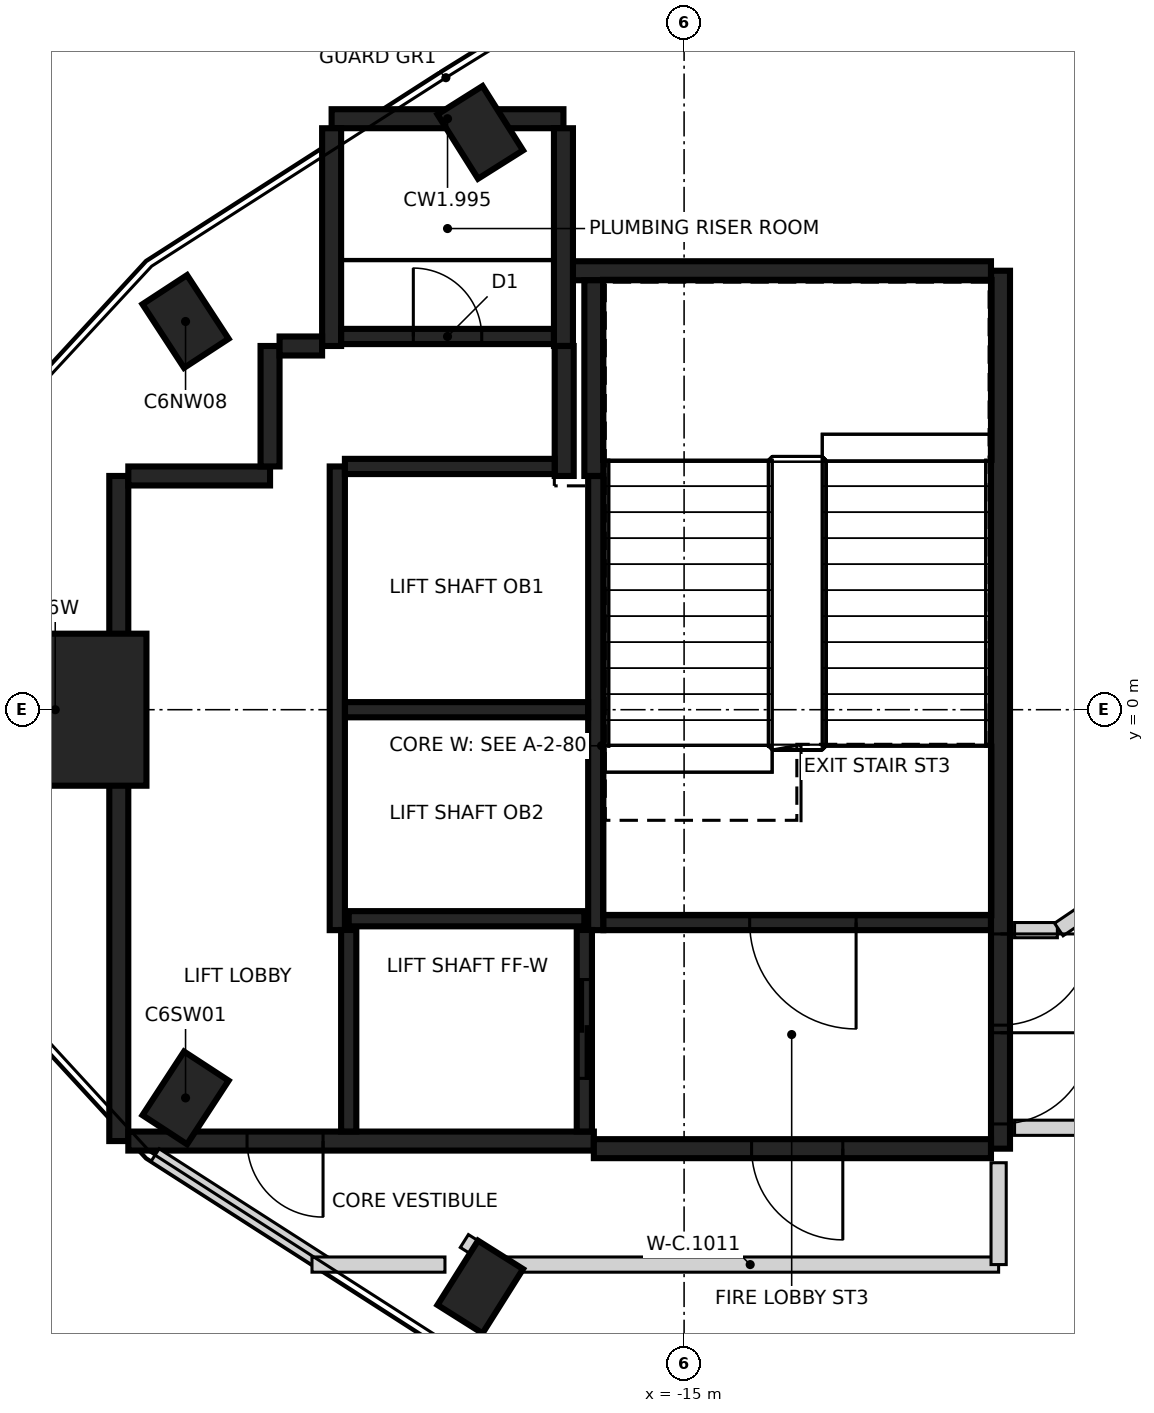
"""IFC4 building model, lengths in metres.
Left out: names, types, materials, properties, quantities, classifications, styles, units other than length and angle.
Written with IfcOpenShell. Run it as: python <this file> out.ifc"""

import sys

from ifc_helpers import new_model, si_unit, direction, frame, frame_2d, origin, origin_2d, place, context, subcontext, project, spatial, rectangle, extrude, element, fill, save


model = new_model("IFC4")
c1 = context("Model", 3, precision=1e-05, world=origin(), true_north=direction((0.0, 1.0)))
c2 = subcontext(c1, "Body", "Model", "MODEL_VIEW")
j1 = project(units=[si_unit("LENGTHUNIT", "METRE"), si_unit("PLANEANGLEUNIT", "RADIAN")], contexts=[c1])
p1 = place(None, origin())
s1 = spatial("IfcSite", under=j1, at=p1, CompositionType="ELEMENT")
p2 = place(p1, origin())
s2 = spatial("IfcBuilding", under=s1, at=p2, CompositionType="ELEMENT")
p3 = place(p2, frame((0.0, 0.0, 283.8)))
s3 = spatial("IfcBuildingStorey", under=s2, at=p3, CompositionType="ELEMENT", Elevation=283.8)
for number, where, z_axis, x_axis in (
    (1, (-17.681, 7.595, -0.35), (0.0, 0.0, 1.0), (-0.533, 0.846, 0.0)),
    (2, (-21.559, 5.107, -0.35), (0.0, 0.0, 1.0), (-0.547, 0.837, 0.0)),
    (3, (-21.559, -5.107, -0.35), (0.0, 0.0, 1.0), (0.547, 0.837, 0.0)),
    (4, (-17.681, -7.595, -0.35), (0.0, 0.0, 1.0), (0.533, 0.846, 0.0)),
):
    element("IfcColumn", number, at=place(p3, frame(where, z_axis=z_axis, x_axis=x_axis)), inside=s3, PredefinedType="COLUMN", context=c2, shape_type="SweptSolid", body=[
        extrude(rectangle(XDim=1.0, YDim=0.7, at=origin_2d()), origin(), (0.0, 0.0, 1.0), 7.2),
    ])
p4 = place(p3, frame((-23.273, 0.0, -0.35), z_axis=(0.0, 0.0, 1.0), x_axis=(1.0, 0.0, 0.0)))
e5 = element("IfcColumn", 5, at=p4, inside=s3, PredefinedType="COLUMN", context=c2, shape_type="SweptSolid", body=[
    extrude(rectangle(XDim=2.4, YDim=2.0, at=origin_2d()), origin(), (0.0, 0.0, 1.0), 7.2),
])
p5 = place(p3, frame((-10.837, 5.775, 0.0), z_axis=(0.0, 0.0, 1.0), x_axis=(0.0, -1.0, 0.0)))
e6 = element("IfcWall", 6, at=p5, inside=s3, PredefinedType="SHEAR", context=c2, shape_type="SweptSolid", body=[
    extrude(rectangle(XDim=11.55, YDim=0.25, at=frame_2d((5.775, 0.0))), origin(), (0.0, 0.0, 1.0), 6.85),
])
p6 = place(p5, frame((10.025, 0.0, 0.0)))
e7 = element("IfcOpeningElement", 7, at=p6, cuts=e6, PredefinedType="OPENING", context=c2, shape_type="SweptSolid", body=[
    extrude(rectangle(XDim=1.2, YDim=2.1, at=frame_2d((0.6, 1.05))), frame((0.0, 0.135, 0.0), z_axis=(0.0, -1.0, 0.0), x_axis=(1.0, 0.0, 0.0)), (0.0, 0.0, 1.0), 0.27),
])
p7 = place(p5, frame((8.725, 0.0, 0.0)))
e8 = element("IfcOpeningElement", 8, at=p7, cuts=e6, PredefinedType="OPENING", context=c2, shape_type="SweptSolid", body=[
    extrude(rectangle(XDim=1.2, YDim=2.1, at=frame_2d((0.6, 1.05))), frame((0.0, 0.135, 0.0), z_axis=(0.0, -1.0, 0.0), x_axis=(1.0, 0.0, 0.0)), (0.0, 0.0, 1.0), 0.27),
])
p8 = place(p3, frame((-22.437, -5.675, 0.0), z_axis=(0.0, 0.0, 1.0), x_axis=(0.0, 1.0, 0.0)))
e9 = element("IfcWall", 9, at=p8, inside=s3, PredefinedType="SHEAR", context=c2, shape_type="SweptSolid", body=[
    extrude(rectangle(XDim=8.75, YDim=0.25, at=frame_2d((4.375, 0.0))), origin(), (0.0, 0.0, 1.0), 6.85),
])
p9 = place(p3, frame((-16.187, -5.675, 0.0), z_axis=(0.0, 0.0, 1.0), x_axis=(-1.0, 0.0, 0.0)))
e10 = element("IfcWall", 10, at=p9, inside=s3, PredefinedType="SHEAR", context=c2, shape_type="SweptSolid", body=[
    extrude(rectangle(XDim=6.125, YDim=0.25, at=frame_2d((3.062, 0.0))), origin(), (0.0, 0.0, 1.0), 6.85),
])
p10 = place(p9, frame((3.563, 0.0, 0.0)))
e11 = element("IfcOpeningElement", 11, at=p10, cuts=e10, PredefinedType="OPENING", context=c2, shape_type="SweptSolid", body=[
    extrude(rectangle(XDim=1.0, YDim=2.1, at=frame_2d((0.5, 1.05))), frame((0.0, 0.135, 0.0), z_axis=(0.0, -1.0, 0.0), x_axis=(1.0, 0.0, 0.0)), (0.0, 0.0, 1.0), 0.27),
])
p11 = place(p3, frame((-10.963, -5.775, 0.0), z_axis=(0.0, 0.0, 1.0), x_axis=(-1.0, 0.0, 0.0)))
e12 = element("IfcWall", 12, at=p11, inside=s3, PredefinedType="SHEAR", context=c2, shape_type="SweptSolid", body=[
    extrude(rectangle(XDim=5.225, YDim=0.25, at=frame_2d((2.612, 0.0))), origin(), (0.0, 0.0, 1.0), 6.85),
])
p12 = place(p11, frame((1.949, 0.0, 0.0)))
e13 = element("IfcOpeningElement", 13, at=p12, cuts=e12, PredefinedType="OPENING", context=c2, shape_type="SweptSolid", body=[
    extrude(rectangle(XDim=1.2, YDim=2.1, at=frame_2d((0.6, 1.05))), frame((0.0, 0.135, 0.0), z_axis=(0.0, -1.0, 0.0), x_axis=(1.0, 0.0, 0.0)), (0.0, 0.0, 1.0), 0.27),
])
p13 = place(p3, frame((-16.472, 5.775, 0.0), z_axis=(0.0, 0.0, 1.0), x_axis=(1.0, 0.0, 0.0)))
e14 = element("IfcWall", 14, at=p13, inside=s3, PredefinedType="SHEAR", context=c2, shape_type="SweptSolid", body=[
    extrude(rectangle(XDim=5.51, YDim=0.25, at=frame_2d((2.755, 0.0))), origin(), (0.0, 0.0, 1.0), 6.85),
])
p14 = place(p3, frame((-19.637, 7.775, 0.0), z_axis=(0.0, 0.0, 1.0), x_axis=(1.0, 0.0, 0.0)))
e15 = element("IfcWall", 15, at=p14, inside=s3, PredefinedType="SHEAR", context=c2, shape_type="SweptSolid", body=[
    extrude(rectangle(XDim=3.05, YDim=0.25, at=frame_2d((1.525, 0.0))), origin(), (0.0, 0.0, 1.0), 6.85),
])
for number, where, z_axis, x_axis in (
    (16, (-16.587, 7.65, 0.0), (0.0, 0.0, 1.0), (0.0, -1.0, 0.0)),
    (17, (-19.637, 4.785, 0.0), (0.0, 0.0, 1.0), (0.0, 1.0, 0.0)),
):
    element("IfcWall", number, at=place(p3, frame(where, z_axis=z_axis, x_axis=x_axis)), inside=s3, PredefinedType="SHEAR", context=c2, shape_type="SweptSolid", body=[
        extrude(rectangle(XDim=2.865, YDim=0.25, at=frame_2d((1.432, 0.0))), origin(), (0.0, 0.0, 1.0), 6.85),
    ])
p15 = place(p3, frame((-16.187, 3.075, 0.0), z_axis=(0.0, 0.0, 1.0), x_axis=(0.0, 1.0, 0.0)))
e18 = element("IfcWall", 18, at=p15, inside=s3, PredefinedType="SHEAR", context=c2, shape_type="SweptSolid", body=[
    extrude(rectangle(XDim=2.575, YDim=0.25, at=frame_2d((1.287, 0.0))), origin(), (0.0, 0.0, 1.0), 6.85),
])
p16 = place(p3, frame((-22.312, 3.075, 0.0), z_axis=(0.0, 0.0, 1.0), x_axis=(1.0, 0.0, 0.0)))
e19 = element("IfcWall", 19, at=p16, inside=s3, PredefinedType="SHEAR", context=c2, shape_type="SweptSolid", body=[
    extrude(rectangle(XDim=1.865, YDim=0.25, at=frame_2d((0.932, 0.0))), origin(), (0.0, 0.0, 1.0), 6.85),
])
p17 = place(p3, frame((-16.577, 4.785, 0.0), z_axis=(0.0, 0.0, 1.0), x_axis=(0.0, -1.0, 0.0)))
e20 = element("IfcWall", 20, at=p17, inside=s3, PredefinedType="SHEAR", context=c2, shape_type="SweptSolid", body=[
    extrude(rectangle(XDim=1.71, YDim=0.25, at=frame_2d((0.855, 0.0))), origin(), (0.0, 0.0, 1.0), 6.85),
])
p18 = place(p3, frame((-20.447, 3.2, 0.0), z_axis=(0.0, 0.0, 1.0), x_axis=(0.0, 1.0, 0.0)))
e21 = element("IfcWall", 21, at=p18, inside=s3, PredefinedType="SHEAR", context=c2, shape_type="SweptSolid", body=[
    extrude(rectangle(XDim=1.584, YDim=0.25, at=frame_2d((0.792, 0.0))), origin(), (0.0, 0.0, 1.0), 6.85),
])
p19 = place(p3, frame((-20.322, 4.785, 0.0), z_axis=(0.0, 0.0, 1.0), x_axis=(1.0, 0.0, 0.0)))
e22 = element("IfcWall", 22, at=p19, inside=s3, PredefinedType="SHEAR", context=c2, shape_type="SweptSolid", body=[
    extrude(rectangle(XDim=0.559, YDim=0.25, at=frame_2d((0.28, 0.0))), origin(), (0.0, 0.0, 1.0), 6.85),
])
p20 = place(p3, frame((-16.162, 3.074, 0.0), z_axis=(0.0, 0.0, 1.0), x_axis=(0.0, -1.0, 0.0)))
e23 = element("IfcWall", 23, at=p20, inside=s3, PredefinedType="SHEAR", context=c2, shape_type="SweptSolid", body=[
    extrude(rectangle(XDim=5.974, YDim=0.2, at=frame_2d((2.987, 0.0))), origin(), (0.0, 0.0, 1.0), 6.85),
])
p21 = place(p3, frame((-19.562, -2.9, 0.0), z_axis=(0.0, 0.0, 1.0), x_axis=(0.0, 1.0, 0.0)))
e24 = element("IfcWall", 24, at=p21, inside=s3, PredefinedType="SHEAR", context=c2, shape_type="SweptSolid", body=[
    extrude(rectangle(XDim=6.1, YDim=0.2, at=frame_2d((3.05, 0.0))), origin(), (0.0, 0.0, 1.0), 6.85),
])
p22 = place(p3, frame((-10.963, -2.8, 0.0), z_axis=(0.0, 0.0, 1.0), x_axis=(-1.0, 0.0, 0.0)))
e25 = element("IfcWall", 25, at=p22, inside=s3, PredefinedType="SHEAR", context=c2, shape_type="SweptSolid", body=[
    extrude(rectangle(XDim=5.098, YDim=0.2, at=frame_2d((2.549, 0.0))), origin(), (0.0, 0.0, 1.0), 6.85),
])
p23 = place(p22, frame((1.774, 0.0, 0.0)))
e26 = element("IfcOpeningElement", 26, at=p23, cuts=e25, PredefinedType="OPENING", context=c2, shape_type="SweptSolid", body=[
    extrude(rectangle(XDim=1.4, YDim=2.1, at=frame_2d((0.7, 1.05))), frame((0.0, 0.11, 0.0), z_axis=(0.0, -1.0, 0.0), x_axis=(1.0, 0.0, 0.0)), (0.0, 0.0, 1.0), 0.22),
])
p24 = place(p3, frame((-16.263, 0.0, 0.0), z_axis=(0.0, 0.0, 1.0), x_axis=(-1.0, 0.0, 0.0)))
e27 = element("IfcWall", 27, at=p24, inside=s3, PredefinedType="SHEAR", context=c2, shape_type="SweptSolid", body=[
    extrude(rectangle(XDim=3.198, YDim=0.2, at=frame_2d((1.599, 0.0))), origin(), (0.0, 0.0, 1.0), 6.85),
])
p25 = place(p3, frame((-19.511, 4.91, 0.0), z_axis=(0.0, 0.0, 1.0), x_axis=(1.0, 0.0, 0.0)))
e28 = element("IfcWall", 28, at=p25, inside=s3, PredefinedType="SHEAR", context=c2, shape_type="SweptSolid", body=[
    extrude(rectangle(XDim=2.798, YDim=0.2, at=frame_2d((1.399, 0.0))), origin(), (0.0, 0.0, 1.0), 6.85),
])
p26 = place(p25, frame((0.949, 0.0, 0.0)))
e29 = element("IfcOpeningElement", 29, at=p26, cuts=e28, PredefinedType="OPENING", context=c2, shape_type="SweptSolid", body=[
    extrude(rectangle(XDim=0.9, YDim=2.1, at=frame_2d((0.45, 1.05))), frame((0.0, 0.11, 0.0), z_axis=(0.0, -1.0, 0.0), x_axis=(1.0, 0.0, 0.0)), (0.0, 0.0, 1.0), 0.22),
])
p27 = place(p3, frame((-19.462, 3.2, 0.0), z_axis=(0.0, 0.0, 1.0), x_axis=(1.0, 0.0, 0.0)))
e30 = element("IfcWall", 30, at=p27, inside=s3, PredefinedType="SHEAR", context=c2, shape_type="SweptSolid", body=[
    extrude(rectangle(XDim=2.759, YDim=0.2, at=frame_2d((1.379, 0.0))), origin(), (0.0, 0.0, 1.0), 6.85),
])
p28 = place(p3, frame((-19.412, -2.75, 0.0), z_axis=(0.0, 0.0, 1.0), x_axis=(1.0, 0.0, 0.0)))
e31 = element("IfcWall", 31, at=p28, inside=s3, PredefinedType="SHEAR", context=c2, shape_type="SweptSolid", body=[
    extrude(rectangle(XDim=3.1, YDim=0.2, at=frame_2d((1.55, 0.0))), origin(), (0.0, 0.0, 1.0), 6.85),
])
p29 = place(p3, frame((-16.312, -2.898, 0.0), z_axis=(0.0, 0.0, 1.0), x_axis=(0.0, -1.0, 0.0)))
e32 = element("IfcWall", 32, at=p29, inside=s3, PredefinedType="SHEAR", context=c2, shape_type="SweptSolid", body=[
    extrude(rectangle(XDim=2.651, YDim=0.2, at=frame_2d((1.325, 0.0))), origin(), (0.0, 0.0, 1.0), 6.85),
])
p30 = place(p29, frame((0.652, 0.0, 0.0)))
e33 = element("IfcOpeningElement", 33, at=p30, cuts=e32, PredefinedType="OPENING", context=c2, shape_type="SweptSolid", body=[
    extrude(rectangle(XDim=1.3, YDim=2.1, at=frame_2d((0.65, 1.05))), frame((0.0, 0.11, 0.0), z_axis=(0.0, -1.0, 0.0), x_axis=(1.0, 0.0, 0.0)), (0.0, 0.0, 1.0), 0.22),
])
p31 = place(p3, frame((-19.412, -5.549, 0.0), z_axis=(0.0, 0.0, 1.0), x_axis=(0.0, 1.0, 0.0)))
e34 = element("IfcWall", 34, at=p31, inside=s3, PredefinedType="SHEAR", context=c2, shape_type="SweptSolid", body=[
    extrude(rectangle(XDim=2.651, YDim=0.2, at=frame_2d((1.325, 0.0))), origin(), (0.0, 0.0, 1.0), 6.85),
])
p32 = place(p3, frame((-21.96, -5.86, 0.0), z_axis=(0.0, 0.0, 1.0), x_axis=(0.841722340019, -0.539910642896, 0.0)))
e35 = element("IfcWall", 35, at=p32, inside=s3, PredefinedType="PARTITIONING", context=c2, shape_type="SweptSolid", body=[
    extrude(rectangle(XDim=2.667, YDim=0.2, at=frame_2d((1.333, 0.0))), origin(), (0.0, 0.0, 1.0), 6.85),
])
p33 = place(p3, frame((-19.896, -7.3, 0.0), z_axis=(0.0, 0.0, 1.0), x_axis=(1.0, 0.0, 0.0)))
e36 = element("IfcWall", 36, at=p33, inside=s3, PredefinedType="PARTITIONING", context=c2, shape_type="SweptSolid", body=[
    extrude(rectangle(XDim=1.75, YDim=0.2, at=frame_2d((0.875, 0.0))), origin(), (0.0, 0.0, 1.0), 5.95),
])
p34 = place(p3, frame((-17.891, -6.99, 0.0), z_axis=(0.0, 0.0, 1.0), x_axis=(0.846106660275, -0.533013620312, 0.0)))
e37 = element("IfcWall", 37, at=p34, inside=s3, PredefinedType="PARTITIONING", context=c2, shape_type="SweptSolid", body=[
    extrude(rectangle(XDim=0.582, YDim=0.2, at=frame_2d((0.291, 0.0))), origin(), (0.0, 0.0, 1.0), 6.85),
])
p35 = place(p3, frame((-17.399, -7.3, 0.0), z_axis=(0.0, 0.0, 1.0), x_axis=(1.0, 0.0, 0.0)))
e38 = element("IfcWall", 38, at=p35, inside=s3, PredefinedType="PARTITIONING", context=c2, shape_type="SweptSolid", body=[
    extrude(rectangle(XDim=6.537, YDim=0.2, at=frame_2d((3.269, 0.0))), origin(), (0.0, 0.0, 1.0), 6.85),
])
p36 = place(p3, frame((-10.862, -7.3, 0.0), z_axis=(0.0, 0.0, 1.0), x_axis=(0.0, 1.0, 0.0)))
e39 = element("IfcWall", 39, at=p36, inside=s3, PredefinedType="PARTITIONING", context=c2, shape_type="SweptSolid", body=[
    extrude(rectangle(XDim=1.34, YDim=0.2, at=frame_2d((0.67, 0.0))), origin(), (0.0, 0.0, 1.0), 6.85),
])
p37 = place(p3, frame((-10.652, -5.5, 0.0), z_axis=(0.0, 0.0, 1.0), x_axis=(1.0, 0.0, 0.0)))
e40 = element("IfcWall", 40, at=p37, inside=s3, PredefinedType="PARTITIONING", context=c2, shape_type="SweptSolid", body=[
    extrude(rectangle(XDim=1.989, YDim=0.2, at=frame_2d((0.995, 0.0))), origin(), (0.0, 0.0, 1.0), 6.85),
])
p38 = place(p3, frame((-10.652, -2.9, 0.0), z_axis=(0.0, 0.0, 1.0), x_axis=(1.0, 0.0, 0.0)))
e41 = element("IfcWall", 41, at=p38, inside=s3, PredefinedType="PARTITIONING", context=c2, shape_type="SweptSolid", body=[
    extrude(rectangle(XDim=0.563, YDim=0.2, at=frame_2d((0.282, 0.0))), origin(), (0.0, 0.0, 1.0), 6.85),
])
p39 = place(p3, frame((-10.07, -2.892, 0.0), z_axis=(0.0, 0.0, 1.0), x_axis=(0.828131902324, 0.560533274974, 0.0)))
e42 = element("IfcWall", 42, at=p39, inside=s3, PredefinedType="PARTITIONING", context=c2, shape_type="SweptSolid", body=[
    extrude(rectangle(XDim=2.332, YDim=0.2, at=frame_2d((1.166, 0.0))), origin(), (0.0, 0.0, 1.0), 6.85),
])
p40 = place(p3, frame((-12.917, -11.631, 0.0), z_axis=(0.0, 0.0, 1.0), x_axis=(0.743160324176, 0.669113392909, 0.0)))
e43 = element("IfcWall", 43, at=p40, inside=s3, PredefinedType="PARTITIONING", context=c2, shape_type="SweptSolid", body=[
    extrude(rectangle(XDim=11.068, YDim=0.2, at=frame_2d((5.534, 0.0))), origin(), (0.0, 0.0, 1.0), 5.95),
])
p41 = place(p30, origin())
e44 = element("IfcDoor", 44, at=p41, inside=s3, OperationType="SLIDING_TO_RIGHT", PredefinedType="DOOR", context=c2, shape_type="SweptSolid", body=[
    extrude(rectangle(XDim=1.3, YDim=2.1, at=frame_2d((0.65, 1.05))), frame((0.0, 0.025, 0.0), z_axis=(0.0, -1.0, 0.0), x_axis=(1.0, 0.0, 0.0)), (0.0, 0.0, 1.0), 0.05),
])
fill(e33, e44)
p42 = place(p10, origin())
e45 = element("IfcDoor", 45, at=p42, inside=s3, OperationType="SINGLE_SWING_LEFT", PredefinedType="DOOR", context=c2, shape_type="SweptSolid", body=[
    extrude(rectangle(XDim=1.0, YDim=2.1, at=frame_2d((0.5, 1.05))), frame((0.0, 0.025, 0.0), z_axis=(0.0, -1.0, 0.0), x_axis=(1.0, 0.0, 0.0)), (0.0, 0.0, 1.0), 0.05),
])
fill(e11, e45)
p43 = place(p6, origin())
e46 = element("IfcDoor", 46, at=p43, inside=s3, OperationType="SINGLE_SWING_LEFT", PredefinedType="DOOR", context=c2, shape_type="SweptSolid", body=[
    extrude(rectangle(XDim=1.2, YDim=2.1, at=frame_2d((0.6, 1.05))), frame((0.0, 0.025, 0.0), z_axis=(0.0, -1.0, 0.0), x_axis=(1.0, 0.0, 0.0)), (0.0, 0.0, 1.0), 0.05),
])
fill(e7, e46)
p44 = place(p7, origin())
e47 = element("IfcDoor", 47, at=p44, inside=s3, OperationType="SINGLE_SWING_RIGHT", PredefinedType="DOOR", context=c2, shape_type="SweptSolid", body=[
    extrude(rectangle(XDim=1.2, YDim=2.1, at=frame_2d((0.6, 1.05))), frame((0.0, 0.025, 0.0), z_axis=(0.0, -1.0, 0.0), x_axis=(1.0, 0.0, 0.0)), (0.0, 0.0, 1.0), 0.05),
])
fill(e8, e47)
p45 = place(p12, origin())
e48 = element("IfcDoor", 48, at=p45, inside=s3, OperationType="SINGLE_SWING_LEFT", PredefinedType="DOOR", context=c2, shape_type="SweptSolid", body=[
    extrude(rectangle(XDim=1.2, YDim=2.1, at=frame_2d((0.6, 1.05))), frame((0.0, 0.025, 0.0), z_axis=(0.0, -1.0, 0.0), x_axis=(1.0, 0.0, 0.0)), (0.0, 0.0, 1.0), 0.05),
])
fill(e13, e48)
p46 = place(p23, origin())
e49 = element("IfcDoor", 49, at=p46, inside=s3, OperationType="SINGLE_SWING_LEFT", PredefinedType="DOOR", context=c2, shape_type="SweptSolid", body=[
    extrude(rectangle(XDim=1.4, YDim=2.1, at=frame_2d((0.7, 1.05))), frame((0.0, 0.025, 0.0), z_axis=(0.0, -1.0, 0.0), x_axis=(1.0, 0.0, 0.0)), (0.0, 0.0, 1.0), 0.05),
])
fill(e26, e49)
p47 = place(p26, origin())
e50 = element("IfcDoor", 50, at=p47, inside=s3, OperationType="SINGLE_SWING_RIGHT", PredefinedType="DOOR", context=c2, shape_type="SweptSolid", body=[
    extrude(rectangle(XDim=0.9, YDim=2.1, at=frame_2d((0.45, 1.05))), frame((0.0, 0.025, 0.0), z_axis=(0.0, -1.0, 0.0), x_axis=(1.0, 0.0, 0.0)), (0.0, 0.0, 1.0), 0.05),
])
fill(e29, e50)
save(model, sys.argv[1])
